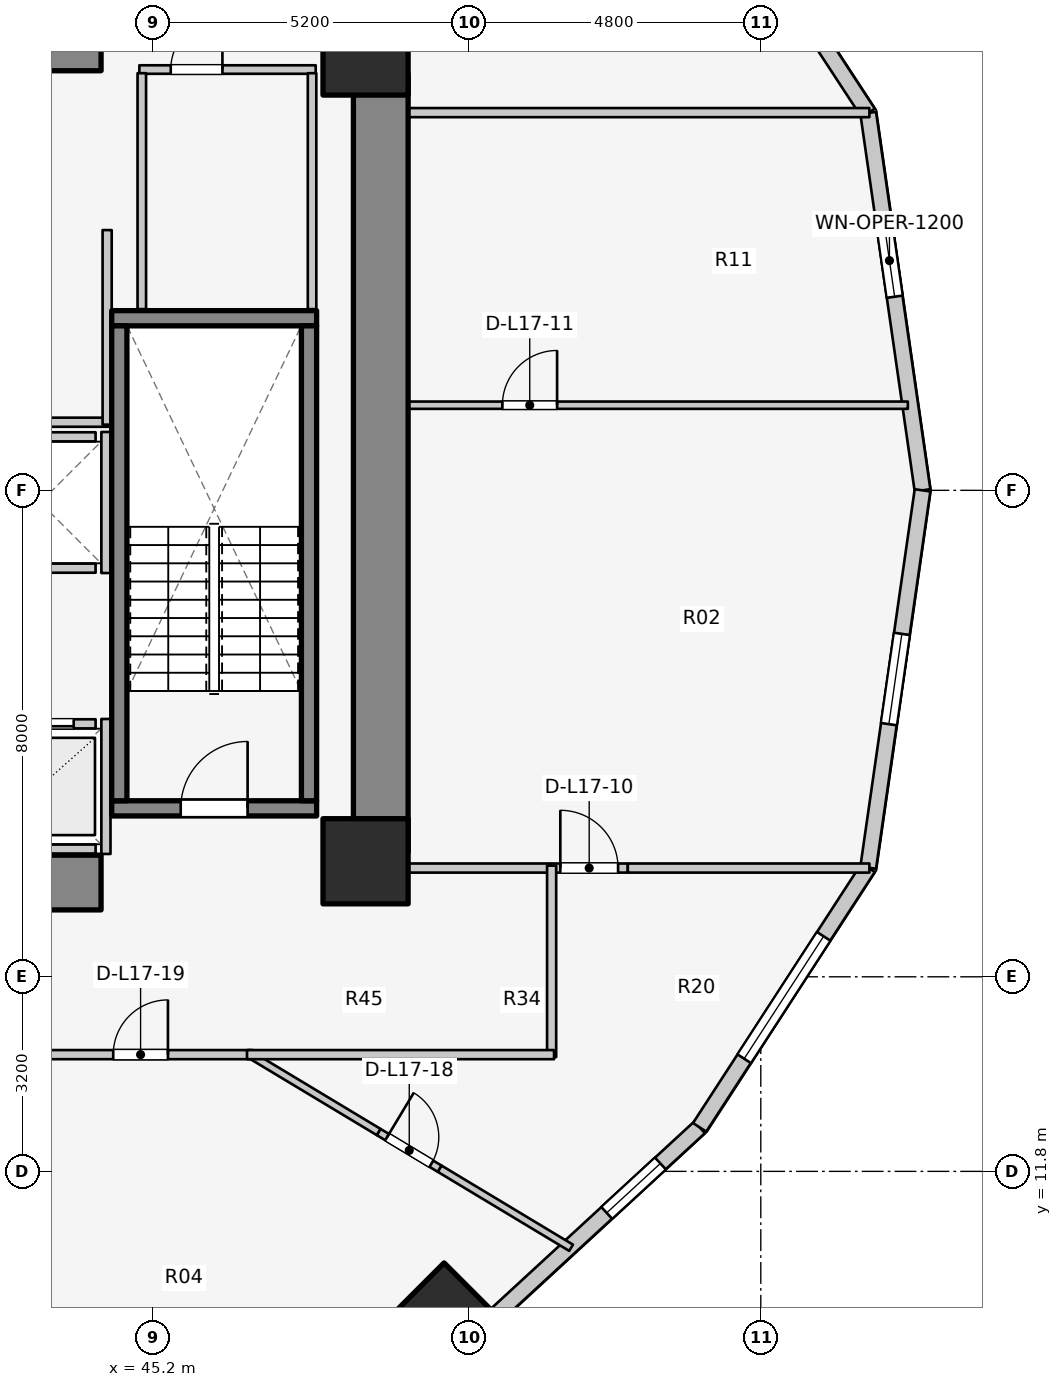
"""IFC4 building model, lengths in metres.
Left out: names, types, materials, properties, quantities, classifications, styles, units other than length and angle.
Written with IfcOpenShell. Run it as: python <this file> out.ifc"""

import sys

from ifc_helpers import new_model, si_unit, direction, frame, frame_2d, origin, origin_2d, place, context, subcontext, project, spatial, rectangle, extrude, element, fill, save


model = new_model("IFC4")
c1 = context("Model", 3, precision=1e-05, world=origin(), true_north=direction((0.0, 1.0)))
c2 = subcontext(c1, "Body", "Model", "MODEL_VIEW")
j1 = project(units=[si_unit("LENGTHUNIT", "METRE"), si_unit("PLANEANGLEUNIT", "RADIAN")], contexts=[c1])
p1 = place(None, origin())
s1 = spatial("IfcSite", under=j1, at=p1, CompositionType="ELEMENT")
p2 = place(p1, origin())
s2 = spatial("IfcBuilding", under=s1, at=p2, CompositionType="ELEMENT")
p3 = place(p2, frame((0.0, 0.0, 58.6)))
s3 = spatial("IfcBuildingStorey", under=s2, at=p3, CompositionType="ELEMENT", Elevation=58.6)
p4 = place(p3, frame((48.95, 17.05, 0.0), z_axis=(0.0, 0.0, 1.0), x_axis=(0.0, 1.0, 0.0)))
e1 = element("IfcWall", 1, at=p4, inside=s3, PredefinedType="SHEAR", context=c2, shape_type="SweptSolid", body=[
    extrude(rectangle(XDim=12.8, YDim=0.9, at=frame_2d((6.4, 0.0))), origin(), (0.0, 0.0, 1.0), 3.1),
])
for number, where, z_axis, x_axis in (
    (2, (39.85, 16.55, 0.0), (0.0, 0.0, 1.0), (1.0, 0.0, 0.0)),
    (3, (39.85, 30.35, 0.0), (0.0, 0.0, 1.0), (1.0, 0.0, 0.0)),
):
    element("IfcWall", number, at=place(p3, frame(where, z_axis=z_axis, x_axis=x_axis)), inside=s3, PredefinedType="SHEAR", context=c2, shape_type="SweptSolid", body=[
        extrude(rectangle(XDim=4.5, YDim=0.9, at=frame_2d((2.25, 0.0))), origin(), (0.0, 0.0, 1.0), 3.1),
    ])
p5 = place(p3, frame((44.525, 17.77, 0.0), z_axis=(0.0, 0.0, 1.0), x_axis=(1.0, 0.0, 0.0)))
e4 = element("IfcWall", 4, at=p5, inside=s3, PredefinedType="SOLIDWALL", context=c2, shape_type="SweptSolid", body=[
    extrude(rectangle(XDim=3.37, YDim=0.25, at=frame_2d((1.685, 0.0))), origin(), (0.0, 0.0, 1.0), 3.1),
])
p6 = place(p5, frame((1.135, 0.0, 0.0)))
e5 = element("IfcOpeningElement", 5, at=p6, cuts=e4, PredefinedType="OPENING", context=c2, shape_type="SweptSolid", body=[
    extrude(rectangle(XDim=1.1, YDim=2.1, at=frame_2d((0.55, 1.05))), frame((0.0, 0.135, 0.0), z_axis=(0.0, -1.0, 0.0), x_axis=(1.0, 0.0, 0.0)), (0.0, 0.0, 1.0), 0.27),
])
p7 = place(p3, frame((44.525, 25.83, 0.0), z_axis=(0.0, 0.0, 1.0), x_axis=(1.0, 0.0, 0.0)))
e6 = element("IfcWall", 6, at=p7, inside=s3, PredefinedType="SOLIDWALL", context=c2, shape_type="SweptSolid", body=[
    extrude(rectangle(XDim=3.37, YDim=0.25, at=frame_2d((1.685, 0.0))), origin(), (0.0, 0.0, 1.0), 3.1),
])
for number, where, z_axis, x_axis in (
    (7, (44.65, 17.895, 0.0), (0.0, 0.0, 1.0), (0.0, 1.0, 0.0)),
    (8, (47.77, 17.895, 0.0), (0.0, 0.0, 1.0), (0.0, 1.0, 0.0)),
):
    element("IfcWall", number, at=place(p3, frame(where, z_axis=z_axis, x_axis=x_axis)), inside=s3, PredefinedType="SOLIDWALL", context=c2, shape_type="SweptSolid", body=[
        extrude(rectangle(XDim=7.81, YDim=0.25, at=frame_2d((3.905, 0.0))), origin(), (0.0, 0.0, 1.0), 3.1),
    ])
for number, where, z_axis, x_axis in (
    (9, (48.7, 16.9, 0.0), (0.0, 0.0, 1.0), (1.0, 0.0, 0.0)),
    (10, (48.7, 30.2, 0.0), (0.0, 0.0, 1.0), (1.0, 0.0, 0.0)),
):
    element("IfcColumn", number, at=place(p3, frame(where, z_axis=z_axis, x_axis=x_axis)), inside=s3, PredefinedType="COLUMN", context=c2, shape_type="SweptSolid", body=[
        extrude(rectangle(XDim=1.4, YDim=1.4, at=origin_2d()), origin(), (0.0, 0.0, 1.0), 3.1),
    ])
p8 = place(p3, frame((49.992, 9.446, 0.0), z_axis=(0.0, 0.0, 1.0), x_axis=(0.707106781187, -0.707106781187, 0.0)))
e11 = element("IfcColumn", 11, at=p8, inside=s3, PredefinedType="COLUMN", context=c2, shape_type="SweptSolid", body=[
    extrude(rectangle(XDim=1.2, YDim=1.2, at=origin_2d()), origin(), (0.0, 0.0, 1.0), 3.1),
])
p9 = place(p3, frame((57.86, 23.0, 0.0), z_axis=(0.0, 0.0, 1.0), x_axis=(-0.142528001686, 0.989790770181, 0.0)))
e12 = element("IfcWall", 12, at=p9, inside=s3, PredefinedType="STANDARD", context=c2, shape_type="SweptSolid", body=[
    extrude(rectangle(XDim=6.269, YDim=0.26, at=frame_2d((3.135, 0.0))), origin(), (0.0, 0.0, 1.0), 2.85),
])
p10 = place(p9, frame((3.217, 0.0, 0.75)))
e13 = element("IfcOpeningElement", 13, at=p10, cuts=e12, PredefinedType="OPENING", context=c2, shape_type="SweptSolid", body=[
    extrude(rectangle(XDim=1.2, YDim=1.5, at=frame_2d((0.6, 0.75))), frame((0.0, 0.14, 0.0), z_axis=(0.0, -1.0, 0.0), x_axis=(1.0, 0.0, 0.0)), (0.0, 0.0, 1.0), 0.28),
])
p11 = place(p3, frame((56.967, 29.205, 0.0), z_axis=(0.0, 0.0, 1.0), x_axis=(-0.547702757047, 0.836672988642, 0.0)))
e14 = element("IfcWall", 14, at=p11, inside=s3, PredefinedType="STANDARD", context=c2, shape_type="SweptSolid", body=[
    extrude(rectangle(XDim=5.062, YDim=0.26, at=frame_2d((2.531, 0.0))), origin(), (0.0, 0.0, 1.0), 2.85),
])
p12 = place(p11, frame((1.331, 0.0, 0.75)))
e15 = element("IfcOpeningElement", 15, at=p12, cuts=e14, PredefinedType="OPENING", context=c2, shape_type="SweptSolid", body=[
    extrude(rectangle(XDim=2.4, YDim=1.7, at=frame_2d((1.2, 0.85))), frame((0.0, 0.14, 0.0), z_axis=(0.0, -1.0, 0.0), x_axis=(1.0, 0.0, 0.0)), (0.0, 0.0, 1.0), 0.28),
])
p13 = place(p3, frame((50.405, 9.035, 0.0), z_axis=(0.0, 0.0, 1.0), x_axis=(0.735655109293, 0.67735630223, 0.0)))
e16 = element("IfcWall", 16, at=p13, inside=s3, PredefinedType="STANDARD", context=c2, shape_type="SweptSolid", body=[
    extrude(rectangle(XDim=5.151, YDim=0.26, at=frame_2d((2.575, 0.0))), origin(), (0.0, 0.0, 1.0), 2.85),
])
p14 = place(p13, frame((3.074, 0.0, 0.75)))
e17 = element("IfcOpeningElement", 17, at=p14, cuts=e16, PredefinedType="OPENING", context=c2, shape_type="SweptSolid", body=[
    extrude(rectangle(XDim=1.2, YDim=1.5, at=frame_2d((0.6, 0.75))), frame((0.0, 0.14, 0.0), z_axis=(0.0, -1.0, 0.0), x_axis=(1.0, 0.0, 0.0)), (0.0, 0.0, 1.0), 0.28),
])
p15 = place(p3, frame((54.194, 12.524, 0.0), z_axis=(0.0, 0.0, 1.0), x_axis=(0.544578722263, 0.838709732421, 0.0)))
e18 = element("IfcWall", 18, at=p15, inside=s3, PredefinedType="STANDARD", context=c2, shape_type="SweptSolid", body=[
    extrude(rectangle(XDim=5.092, YDim=0.26, at=frame_2d((2.546, 0.0))), origin(), (0.0, 0.0, 1.0), 2.85),
])
p16 = place(p15, frame((1.346, 0.0, 0.75)))
e19 = element("IfcOpeningElement", 19, at=p16, cuts=e18, PredefinedType="OPENING", context=c2, shape_type="SweptSolid", body=[
    extrude(rectangle(XDim=2.4, YDim=1.7, at=frame_2d((1.2, 0.85))), frame((0.0, 0.14, 0.0), z_axis=(0.0, -1.0, 0.0), x_axis=(1.0, 0.0, 0.0)), (0.0, 0.0, 1.0), 0.28),
])
p17 = place(p3, frame((56.967, 16.795, 0.0), z_axis=(0.0, 0.0, 1.0), x_axis=(0.142528001686, 0.989790770181, 0.0)))
e20 = element("IfcWall", 20, at=p17, inside=s3, PredefinedType="STANDARD", context=c2, shape_type="SweptSolid", body=[
    extrude(rectangle(XDim=6.269, YDim=0.26, at=frame_2d((3.135, 0.0))), origin(), (0.0, 0.0, 1.0), 2.85),
])
p18 = place(p17, frame((2.385, 0.0, 0.75)))
e21 = element("IfcOpeningElement", 21, at=p18, cuts=e20, PredefinedType="OPENING", context=c2, shape_type="SweptSolid", body=[
    extrude(rectangle(XDim=1.5, YDim=1.6, at=frame_2d((0.75, 0.8))), frame((0.0, 0.14, 0.0), z_axis=(0.0, -1.0, 0.0), x_axis=(1.0, 0.0, 0.0)), (0.0, 0.0, 1.0), 0.28),
])
p19 = place(p3, frame((42.44, 19.16, 0.0), z_axis=(0.0, 0.0, 1.0), x_axis=(1.0, 0.0, 0.0)))
e22 = element("IfcWall", 22, at=p19, inside=s3, PredefinedType="SOLIDWALL", context=c2, shape_type="SweptSolid", body=[
    extrude(rectangle(XDim=1.82, YDim=0.15, at=frame_2d((0.91, 0.0))), origin(), (0.0, 0.0, 1.0), 2.855),
])
p20 = place(p19, frame((0.36, 0.0, 0.0)))
e23 = element("IfcOpeningElement", 23, at=p20, cuts=e22, PredefinedType="OPENING", context=c2, shape_type="SweptSolid", body=[
    extrude(rectangle(XDim=1.1, YDim=2.1, at=frame_2d((0.55, 1.05))), frame((0.0, 0.085, 0.0), z_axis=(0.0, -1.0, 0.0), x_axis=(1.0, 0.0, 0.0)), (0.0, 0.0, 1.0), 0.17),
])
p21 = place(p3, frame((42.44, 17.1, 0.0), z_axis=(0.0, 0.0, 1.0), x_axis=(1.0, 0.0, 0.0)))
e24 = element("IfcWall", 24, at=p21, inside=s3, PredefinedType="SOLIDWALL", context=c2, shape_type="SweptSolid", body=[
    extrude(rectangle(XDim=1.82, YDim=0.15, at=frame_2d((0.91, 0.0))), origin(), (0.0, 0.0, 1.0), 2.855),
])
p22 = place(p3, frame((44.43, 17.02, 0.0), z_axis=(0.0, 0.0, 1.0), x_axis=(0.0, 1.0, 0.0)))
e25 = element("IfcWall", 25, at=p22, inside=s3, PredefinedType="SOLIDWALL", context=c2, shape_type="SweptSolid", body=[
    extrude(rectangle(XDim=2.22, YDim=0.15, at=frame_2d((1.11, 0.0))), origin(), (0.0, 0.0, 1.0), 2.12),
])
for number, where, z_axis, x_axis in (
    (26, (42.44, 21.72, 0.0), (0.0, 0.0, 1.0), (1.0, 0.0, 0.0)),
    (27, (42.44, 23.88, 0.0), (0.0, 0.0, 1.0), (1.0, 0.0, 0.0)),
):
    element("IfcWall", number, at=place(p3, frame(where, z_axis=z_axis, x_axis=x_axis)), inside=s3, PredefinedType="SOLIDWALL", context=c2, shape_type="SweptSolid", body=[
        extrude(rectangle(XDim=1.82, YDim=0.15, at=frame_2d((0.91, 0.0))), origin(), (0.0, 0.0, 1.0), 2.855),
    ])
p23 = place(p3, frame((44.43, 21.64, 0.0), z_axis=(0.0, 0.0, 1.0), x_axis=(0.0, 1.0, 0.0)))
e28 = element("IfcWall", 28, at=p23, inside=s3, PredefinedType="SOLIDWALL", context=c2, shape_type="SweptSolid", body=[
    extrude(rectangle(XDim=2.32, YDim=0.15, at=frame_2d((1.16, 0.0))), origin(), (0.0, 0.0, 1.0), 2.855),
])
p24 = place(p3, frame((39.4, 24.12, 0.0), z_axis=(0.0, 0.0, 1.0), x_axis=(1.0, 0.0, 0.0)))
e29 = element("IfcWall", 29, at=p24, inside=s3, PredefinedType="PARTITIONING", context=c2, shape_type="SweptSolid", body=[
    extrude(rectangle(XDim=5.08, YDim=0.15, at=frame_2d((2.54, 0.0))), origin(), (0.0, 0.0, 1.0), 2.12),
])
p25 = place(p3, frame((44.45, 24.08, 0.0), z_axis=(0.0, 0.0, 1.0), x_axis=(0.0, 1.0, 0.0)))
e30 = element("IfcWall", 30, at=p25, inside=s3, PredefinedType="PARTITIONING", context=c2, shape_type="SweptSolid", body=[
    extrude(rectangle(XDim=3.2, YDim=0.15, at=frame_2d((1.6, 0.0))), origin(), (0.0, 0.0, 1.0), 2.855),
])
p26 = place(p3, frame((44.98, 29.92, 0.0), z_axis=(0.0, 0.0, 1.0), x_axis=(1.0, 0.0, 0.0)))
e31 = element("IfcWall", 31, at=p26, inside=s3, PredefinedType="PLUMBINGWALL", context=c2, shape_type="SweptSolid", body=[
    extrude(rectangle(XDim=2.9, YDim=0.14, at=frame_2d((1.45, 0.0))), origin(), (0.0, 0.0, 1.0), 2.855),
])
p27 = place(p26, frame((0.516, 0.0, 0.0)))
e32 = element("IfcOpeningElement", 32, at=p27, cuts=e31, PredefinedType="OPENING", context=c2, shape_type="SweptSolid", body=[
    extrude(rectangle(XDim=0.85, YDim=2.05, at=frame_2d((0.425, 1.025))), frame((0.0, 0.08, 0.0), z_axis=(0.0, -1.0, 0.0), x_axis=(1.0, 0.0, 0.0)), (0.0, 0.0, 1.0), 0.16),
])
for number, where, z_axis, x_axis in (
    (33, (45.02, 25.98, 0.0), (0.0, 0.0, 1.0), (0.0, 1.0, 0.0)),
    (34, (47.82, 25.98, 0.0), (0.0, 0.0, 1.0), (0.0, 1.0, 0.0)),
):
    element("IfcWall", number, at=place(p3, frame(where, z_axis=z_axis, x_axis=x_axis)), inside=s3, PredefinedType="PLUMBINGWALL", context=c2, shape_type="SweptSolid", body=[
        extrude(rectangle(XDim=3.88, YDim=0.14, at=frame_2d((1.94, 0.0))), origin(), (0.0, 0.0, 1.0), 2.855),
    ])
p28 = place(p3, frame((48.95, 16.788, 0.0), z_axis=(0.0, 0.0, 1.0), x_axis=(1.0, 0.0, 0.0)))
e35 = element("IfcWall", 35, at=p28, inside=s3, PredefinedType="PARTITIONING", context=c2, shape_type="SweptSolid", body=[
    extrude(rectangle(XDim=2.793, YDim=0.15, at=frame_2d((1.396, 0.0))), origin(), (0.0, 0.0, 1.0), 2.069),
])
p29 = place(p3, frame((51.743, 16.788, 0.0), z_axis=(0.0, 0.0, 1.0), x_axis=(1.0, 0.0, 0.0)))
e36 = element("IfcWall", 36, at=p29, inside=s3, PredefinedType="PARTITIONING", context=c2, shape_type="SweptSolid", body=[
    extrude(rectangle(XDim=1.27, YDim=0.15, at=frame_2d((0.635, 0.0))), origin(), (0.0, 0.0, 1.0), 2.855),
])
p30 = place(p29, frame((0.16, 0.0, 0.0)))
e37 = element("IfcOpeningElement", 37, at=p30, cuts=e36, PredefinedType="OPENING", context=c2, shape_type="SweptSolid", body=[
    extrude(rectangle(XDim=0.95, YDim=2.1, at=frame_2d((0.475, 1.05))), frame((0.0, 0.085, 0.0), z_axis=(0.0, -1.0, 0.0), x_axis=(1.0, 0.0, 0.0)), (0.0, 0.0, 1.0), 0.17),
])
p31 = place(p3, frame((53.013, 16.788, 0.0), z_axis=(0.0, 0.0, 1.0), x_axis=(1.0, 0.0, 0.0)))
e38 = element("IfcWall", 38, at=p31, inside=s3, PredefinedType="PARTITIONING", context=c2, shape_type="SweptSolid", body=[
    extrude(rectangle(XDim=3.973, YDim=0.15, at=frame_2d((1.987, 0.0))), origin(), (0.0, 0.0, 1.0), 2.855),
])
p32 = place(p3, frame((48.95, 29.212, 0.0), z_axis=(0.0, 0.0, 1.0), x_axis=(1.0, 0.0, 0.0)))
e39 = element("IfcWall", 39, at=p32, inside=s3, PredefinedType="PARTITIONING", context=c2, shape_type="SweptSolid", body=[
    extrude(rectangle(XDim=8.036, YDim=0.15, at=frame_2d((4.018, 0.0))), origin(), (0.0, 0.0, 1.0), 2.855),
])
p33 = place(p3, frame((48.95, 24.4, 0.0), z_axis=(0.0, 0.0, 1.0), x_axis=(1.0, 0.0, 0.0)))
e40 = element("IfcWall", 40, at=p33, inside=s3, PredefinedType="MOVABLE", context=c2, shape_type="SweptSolid", body=[
    extrude(rectangle(XDim=8.669, YDim=0.12, at=frame_2d((4.334, 0.0))), origin(), (0.0, 0.0, 1.0), 2.855),
])
p34 = place(p33, frame((2.0, 0.0, 0.0)))
e41 = element("IfcOpeningElement", 41, at=p34, cuts=e40, PredefinedType="OPENING", context=c2, shape_type="SweptSolid", body=[
    extrude(rectangle(XDim=0.9, YDim=2.1, at=frame_2d((0.45, 1.05))), frame((0.0, 0.07, 0.0), z_axis=(0.0, -1.0, 0.0), x_axis=(1.0, 0.0, 0.0)), (0.0, 0.0, 1.0), 0.14),
])
p35 = place(p3, frame((48.95, 29.8, 0.0), z_axis=(0.0, 0.0, 1.0), x_axis=(0.0, 1.0, 0.0)))
e42 = element("IfcWall", 42, at=p35, inside=s3, PredefinedType="PARTITIONING", context=c2, shape_type="SweptSolid", body=[
    extrude(rectangle(XDim=1.29, YDim=0.15, at=frame_2d((0.645, 0.0))), origin(), (0.0, 0.0, 1.0), 2.069),
])
p36 = place(p3, frame((51.76, 13.68, 0.0), z_axis=(0.0, 0.0, 1.0), x_axis=(0.0, 1.0, 0.0)))
e43 = element("IfcWall", 43, at=p36, inside=s3, PredefinedType="PARTITIONING", context=c2, shape_type="SweptSolid", body=[
    extrude(rectangle(XDim=3.148, YDim=0.15, at=frame_2d((1.574, 0.0))), origin(), (0.0, 0.0, 1.0), 2.855),
])
p37 = place(p3, frame((46.757, 13.746, 0.0), z_axis=(0.0, 0.0, 1.0), x_axis=(0.856885623316, -0.515506574696, 0.0)))
e44 = element("IfcWall", 44, at=p37, inside=s3, PredefinedType="MOVABLE", context=c2, shape_type="SweptSolid", body=[
    extrude(rectangle(XDim=2.521, YDim=0.12, at=frame_2d((1.26, 0.0))), origin(), (0.0, 0.0, 1.0), 2.855),
])
p38 = place(p3, frame((48.917, 12.446, 0.0), z_axis=(0.0, 0.0, 1.0), x_axis=(0.856958544896, -0.515385343534, 0.0)))
e45 = element("IfcWall", 45, at=p38, inside=s3, PredefinedType="MOVABLE", context=c2, shape_type="SweptSolid", body=[
    extrude(rectangle(XDim=1.17, YDim=0.12, at=frame_2d((0.585, 0.0))), origin(), (0.0, 0.0, 1.0), 2.11),
])
p39 = place(p38, frame((0.16, 0.0, 0.0)))
e46 = element("IfcOpeningElement", 46, at=p39, cuts=e45, PredefinedType="OPENING", context=c2, shape_type="SweptSolid", body=[
    extrude(rectangle(XDim=0.85, YDim=2.05, at=frame_2d((0.425, 1.025))), frame((0.0, 0.07, 0.0), z_axis=(0.0, -1.0, 0.0), x_axis=(1.0, 0.0, 0.0)), (0.0, 0.0, 1.0), 0.14),
])
p40 = place(p3, frame((49.92, 11.843, 0.0), z_axis=(0.0, 0.0, 1.0), x_axis=(0.856902668222, -0.515478241243, 0.0)))
e47 = element("IfcWall", 47, at=p40, inside=s3, PredefinedType="MOVABLE", context=c2, shape_type="SweptSolid", body=[
    extrude(rectangle(XDim=2.521, YDim=0.12, at=frame_2d((1.26, 0.0))), origin(), (0.0, 0.0, 1.0), 2.855),
])
p41 = place(p3, frame((39.33, 13.72, 0.0), z_axis=(0.0, 0.0, 1.0), x_axis=(1.0, 0.0, 0.0)))
e48 = element("IfcWall", 48, at=p41, inside=s3, PredefinedType="PARTITIONING", context=c2, shape_type="SweptSolid", body=[
    extrude(rectangle(XDim=7.52, YDim=0.15, at=frame_2d((3.76, 0.0))), origin(), (0.0, 0.0, 1.0), 2.237),
])
p42 = place(p41, frame((5.22, 0.0, 0.0)))
e49 = element("IfcOpeningElement", 49, at=p42, cuts=e48, PredefinedType="OPENING", context=c2, shape_type="SweptSolid", body=[
    extrude(rectangle(XDim=0.9, YDim=2.1, at=frame_2d((0.45, 1.05))), frame((0.0, 0.085, 0.0), z_axis=(0.0, -1.0, 0.0), x_axis=(1.0, 0.0, 0.0)), (0.0, 0.0, 1.0), 0.17),
])
p43 = place(p3, frame((46.75, 13.72, 0.0), z_axis=(0.0, 0.0, 1.0), x_axis=(1.0, 0.0, 0.0)))
e50 = element("IfcWall", 50, at=p43, inside=s3, PredefinedType="PARTITIONING", context=c2, shape_type="SweptSolid", body=[
    extrude(rectangle(XDim=5.05, YDim=0.15, at=frame_2d((2.525, 0.0))), origin(), (0.0, 0.0, 1.0), 2.069),
])
p44 = place(p3, frame((37.249, 13.085, 0.0), z_axis=(0.0, 0.0, 1.0), x_axis=(0.793181014702, -0.608985942298, 0.0)))
e51 = element("IfcWall", 51, at=p44, inside=s3, PredefinedType="PARTITIONING", context=c2, shape_type="SweptSolid", body=[
    extrude(rectangle(XDim=10.324, YDim=0.18, at=frame_2d((5.162, 0.0))), origin(), (0.0, 0.0, 1.0), 2.237),
])
p45 = place(p10, origin())
e52 = element("IfcWindow", 52, at=p45, inside=s3, PartitioningType="SINGLE_PANEL", PredefinedType="WINDOW", context=c2, shape_type="SweptSolid", body=[
    extrude(rectangle(XDim=1.2, YDim=1.5, at=frame_2d((0.6, 0.75))), frame((0.0, 0.03, 0.0), z_axis=(0.0, -1.0, 0.0), x_axis=(1.0, 0.0, 0.0)), (0.0, 0.0, 1.0), 0.06),
])
fill(e13, e52)
p46 = place(p14, origin())
e53 = element("IfcWindow", 53, at=p46, inside=s3, PartitioningType="SINGLE_PANEL", PredefinedType="WINDOW", context=c2, shape_type="SweptSolid", body=[
    extrude(rectangle(XDim=1.2, YDim=1.5, at=frame_2d((0.6, 0.75))), frame((0.0, 0.03, 0.0), z_axis=(0.0, -1.0, 0.0), x_axis=(1.0, 0.0, 0.0)), (0.0, 0.0, 1.0), 0.06),
])
fill(e17, e53)
p47 = place(p16, origin())
e54 = element("IfcWindow", 54, at=p47, inside=s3, PartitioningType="SINGLE_PANEL", PredefinedType="WINDOW", context=c2, shape_type="SweptSolid", body=[
    extrude(rectangle(XDim=2.4, YDim=1.7, at=frame_2d((1.2, 0.85))), frame((0.0, 0.03, 0.0), z_axis=(0.0, -1.0, 0.0), x_axis=(1.0, 0.0, 0.0)), (0.0, 0.0, 1.0), 0.06),
])
fill(e19, e54)
p48 = place(p18, origin())
e55 = element("IfcWindow", 55, at=p48, inside=s3, PartitioningType="SINGLE_PANEL", PredefinedType="WINDOW", context=c2, shape_type="SweptSolid", body=[
    extrude(rectangle(XDim=1.5, YDim=1.6, at=frame_2d((0.75, 0.8))), frame((0.0, 0.03, 0.0), z_axis=(0.0, -1.0, 0.0), x_axis=(1.0, 0.0, 0.0)), (0.0, 0.0, 1.0), 0.06),
])
fill(e21, e55)
p49 = place(p6, origin())
e56 = element("IfcDoor", 56, at=p49, inside=s3, OperationType="SINGLE_SWING_RIGHT", PredefinedType="DOOR", context=c2, shape_type="SweptSolid", body=[
    extrude(rectangle(XDim=1.1, YDim=2.1, at=frame_2d((0.55, 1.05))), frame((0.0, 0.025, 0.0), z_axis=(0.0, -1.0, 0.0), x_axis=(1.0, 0.0, 0.0)), (0.0, 0.0, 1.0), 0.05),
])
fill(e5, e56)
p50 = place(p20, origin())
e57 = element("IfcDoor", 57, at=p50, inside=s3, OperationType="DOUBLE_DOOR_SLIDING", PredefinedType="DOOR", context=c2, shape_type="SweptSolid", body=[
    extrude(rectangle(XDim=1.1, YDim=2.1, at=frame_2d((0.55, 1.05))), frame((0.0, 0.025, 0.0), z_axis=(0.0, -1.0, 0.0), x_axis=(1.0, 0.0, 0.0)), (0.0, 0.0, 1.0), 0.05),
])
fill(e23, e57)
p51 = place(p27, origin())
e58 = element("IfcDoor", 58, at=p51, inside=s3, OperationType="SINGLE_SWING_RIGHT", PredefinedType="DOOR", context=c2, shape_type="SweptSolid", body=[
    extrude(rectangle(XDim=0.85, YDim=2.05, at=frame_2d((0.425, 1.025))), frame((0.0, 0.025, 0.0), z_axis=(0.0, -1.0, 0.0), x_axis=(1.0, 0.0, 0.0)), (0.0, 0.0, 1.0), 0.05),
])
fill(e32, e58)
p52 = place(p30, origin())
e59 = element("IfcDoor", 59, at=p52, inside=s3, OperationType="SINGLE_SWING_LEFT", PredefinedType="DOOR", context=c2, shape_type="SweptSolid", body=[
    extrude(rectangle(XDim=0.95, YDim=2.1, at=frame_2d((0.475, 1.05))), frame((0.0, 0.025, 0.0), z_axis=(0.0, -1.0, 0.0), x_axis=(1.0, 0.0, 0.0)), (0.0, 0.0, 1.0), 0.05),
])
fill(e37, e59)
p53 = place(p34, origin())
e60 = element("IfcDoor", 60, at=p53, inside=s3, OperationType="SINGLE_SWING_RIGHT", PredefinedType="DOOR", context=c2, shape_type="SweptSolid", body=[
    extrude(rectangle(XDim=0.9, YDim=2.1, at=frame_2d((0.45, 1.05))), frame((0.0, 0.025, 0.0), z_axis=(0.0, -1.0, 0.0), x_axis=(1.0, 0.0, 0.0)), (0.0, 0.0, 1.0), 0.05),
])
fill(e41, e60)
p54 = place(p39, origin())
e61 = element("IfcDoor", 61, at=p54, inside=s3, OperationType="SINGLE_SWING_LEFT", PredefinedType="DOOR", context=c2, shape_type="SweptSolid", body=[
    extrude(rectangle(XDim=0.85, YDim=2.05, at=frame_2d((0.425, 1.025))), frame((0.0, 0.025, 0.0), z_axis=(0.0, -1.0, 0.0), x_axis=(1.0, 0.0, 0.0)), (0.0, 0.0, 1.0), 0.05),
])
fill(e46, e61)
p55 = place(p42, origin())
e62 = element("IfcDoor", 62, at=p55, inside=s3, OperationType="SINGLE_SWING_RIGHT", PredefinedType="DOOR", context=c2, shape_type="SweptSolid", body=[
    extrude(rectangle(XDim=0.9, YDim=2.1, at=frame_2d((0.45, 1.05))), frame((0.0, 0.025, 0.0), z_axis=(0.0, -1.0, 0.0), x_axis=(1.0, 0.0, 0.0)), (0.0, 0.0, 1.0), 0.05),
])
fill(e49, e62)
save(model, sys.argv[1])
